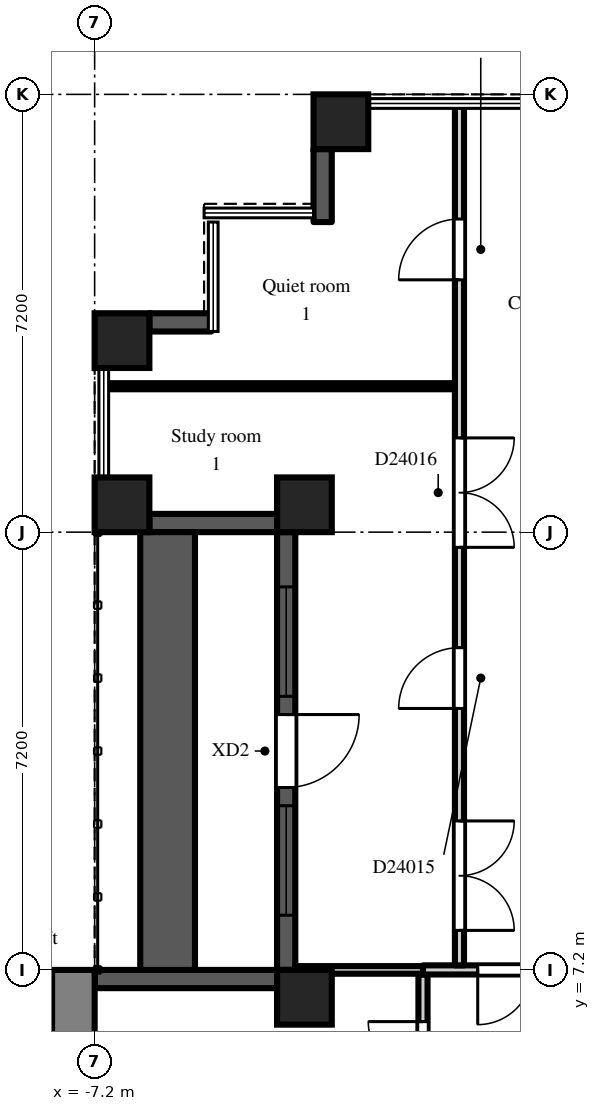
"""IFC4 building model, lengths in metres.
Left out: names, types, materials, properties, quantities, classifications, styles, units other than length and angle.
Written with IfcOpenShell. Run it as: python <this file> out.ifc"""

import sys

from ifc_helpers import new_model, si_unit, direction, frame, frame_2d, origin, origin_2d, place, context, subcontext, project, spatial, rectangle, extrude, element, fill, save


model = new_model("IFC4")
c1 = context("Model", 3, precision=1e-05, world=origin(), true_north=direction((0.0, 1.0)))
c2 = subcontext(c1, "Body", "Model", "MODEL_VIEW")
j1 = project(units=[si_unit("LENGTHUNIT", "METRE"), si_unit("PLANEANGLEUNIT", "RADIAN")], contexts=[c1])
p1 = place(None, origin())
s1 = spatial("IfcSite", under=j1, at=p1, CompositionType="ELEMENT")
p2 = place(p1, origin())
s2 = spatial("IfcBuilding", under=s1, at=p2, CompositionType="ELEMENT")
p3 = place(p2, frame((0.0, 0.0, 166.5)))
s3 = spatial("IfcBuildingStorey", under=s2, at=p3, CompositionType="ELEMENT", Elevation=166.5)
for number, where, z_axis, x_axis in (
    (1, (-6.75, 14.85, 0.0), (0.0, 0.0, 1.0), (1.0, 0.0, 0.0)),
    (2, (-6.75, 17.55, 0.0), (0.0, 0.0, 1.0), (1.0, 0.0, 0.0)),
    (3, (-3.75, 6.75, 0.0), (0.0, 0.0, 1.0), (1.0, 0.0, 0.0)),
    (4, (-3.75, 14.85, 0.0), (0.0, 0.0, 1.0), (1.0, 0.0, 0.0)),
    (5, (-3.15, 21.15, 0.0), (0.0, 0.0, 1.0), (1.0, 0.0, 0.0)),
):
    element("IfcColumn", number, at=place(p3, frame(where, z_axis=z_axis, x_axis=x_axis)), inside=s3, PredefinedType="COLUMN", context=c2, shape_type="SweptSolid", body=[
        extrude(rectangle(XDim=0.9, YDim=0.9, at=origin_2d()), origin(), (0.0, 0.0, 1.0), 4.2),
    ])
p4 = place(p3, frame((-3.45, 20.7, 0.0), z_axis=(0.0, 0.0, 1.0), x_axis=(0.0, -1.0, 0.0)))
e6 = element("IfcWall", 6, at=p4, inside=s3, PredefinedType="SOLIDWALL", context=c2, shape_type="SweptSolid", body=[
    extrude(rectangle(XDim=1.2, YDim=0.3, at=frame_2d((0.6, 0.0))), origin(), (0.0, 0.0, 1.0), 3.8),
])
p5 = place(p3, frame((-5.28, 17.85, 0.0), z_axis=(0.0, 0.0, 1.0), x_axis=(-1.0, 0.0, 0.0)))
e7 = element("IfcWall", 7, at=p5, inside=s3, PredefinedType="SOLIDWALL", context=c2, shape_type="SweptSolid", body=[
    extrude(rectangle(XDim=1.02, YDim=0.3, at=frame_2d((0.51, 0.0))), origin(), (0.0, 0.0, 1.0), 3.8),
])
p6 = place(p3, frame((-6.3, 14.55, 0.0), z_axis=(0.0, 0.0, 1.0), x_axis=(1.0, 0.0, 0.0)))
e8 = element("IfcWall", 8, at=p6, inside=s3, PredefinedType="SOLIDWALL", context=c2, shape_type="SweptSolid", body=[
    extrude(rectangle(XDim=2.1, YDim=0.3, at=frame_2d((1.05, 0.0))), origin(), (0.0, 0.0, 1.0), 3.4),
])
p7 = place(p3, frame((-4.05, 14.4, 0.0), z_axis=(0.0, 0.0, 1.0), x_axis=(0.0, -1.0, 0.0)))
e9 = element("IfcWall", 9, at=p7, inside=s3, PredefinedType="SOLIDWALL", context=c2, shape_type="SweptSolid", body=[
    extrude(rectangle(XDim=7.2, YDim=0.3, at=frame_2d((3.6, 0.0))), origin(), (0.0, 0.0, 1.0), 3.4),
])
p8 = place(p7, frame((3.0, 0.0, 0.0)))
e10 = element("IfcOpeningElement", 10, at=p8, cuts=e9, PredefinedType="OPENING", context=c2, shape_type="SweptSolid", body=[
    extrude(rectangle(XDim=1.2, YDim=2.05, at=frame_2d((0.6, 1.025))), frame((0.0, 0.16, 0.0), z_axis=(0.0, -1.0, 0.0), x_axis=(1.0, 0.0, 0.0)), (0.0, 0.0, 1.0), 0.32),
])
p9 = place(p7, frame((0.9, 0.0, 0.2)))
e11 = element("IfcOpeningElement", 11, at=p9, cuts=e9, PredefinedType="OPENING", context=c2, shape_type="SweptSolid", body=[
    extrude(rectangle(XDim=1.8, YDim=1.85, at=frame_2d((0.9, 0.925))), frame((0.0, 0.16, 0.0), z_axis=(0.0, -1.0, 0.0), x_axis=(1.0, 0.0, 0.0)), (0.0, 0.0, 1.0), 0.32),
])
p10 = place(p7, frame((4.5, 0.0, 0.2)))
e12 = element("IfcOpeningElement", 12, at=p10, cuts=e9, PredefinedType="OPENING", context=c2, shape_type="SweptSolid", body=[
    extrude(rectangle(XDim=1.8, YDim=1.85, at=frame_2d((0.9, 0.925))), frame((0.0, 0.16, 0.0), z_axis=(0.0, -1.0, 0.0), x_axis=(1.0, 0.0, 0.0)), (0.0, 0.0, 1.0), 0.32),
])
p11 = place(p3, frame((-4.2, 7.05, 0.0), z_axis=(0.0, 0.0, 1.0), x_axis=(-1.0, 0.0, 0.0)))
e13 = element("IfcWall", 13, at=p11, inside=s3, PredefinedType="SOLIDWALL", context=c2, shape_type="SweptSolid", body=[
    extrude(rectangle(XDim=3.0, YDim=0.3, at=frame_2d((1.5, 0.0))), origin(), (0.0, 0.0, 1.0), 3.4),
])
p12 = place(p3, frame((-6.0, 7.2, 0.0), z_axis=(0.0, 0.0, 1.0), x_axis=(0.0, 1.0, 0.0)))
e14 = element("IfcWall", 14, at=p12, inside=s3, PredefinedType="PARAPET", context=c2, shape_type="SweptSolid", body=[
    extrude(rectangle(XDim=7.2, YDim=0.9, at=frame_2d((3.6, 0.0))), origin(), (0.0, 0.0, 1.0), 0.8),
])
p13 = place(p3, frame((-7.55, -7.2, 0.0), z_axis=(0.0, 0.0, 1.0), x_axis=(0.0, 1.0, 0.0)))
e15 = element("IfcWall", 15, at=p13, inside=s3, PredefinedType="SHEAR", context=c2, shape_type="SweptSolid", body=[
    extrude(rectangle(XDim=14.4, YDim=0.7, at=frame_2d((7.2, 0.0))), origin(), (0.0, 0.0, 1.0), 3.8),
])
p14 = place(p13, frame((6.0, 0.0, 0.0)))
e16 = element("IfcOpeningElement", 16, at=p14, cuts=e15, PredefinedType="OPENING", context=c2, shape_type="SweptSolid", body=[
    extrude(rectangle(XDim=2.4, YDim=2.2, at=frame_2d((1.2, 1.1))), frame((0.0, 0.36, 0.0), z_axis=(0.0, -1.0, 0.0), x_axis=(1.0, 0.0, 0.0)), (0.0, 0.0, 1.0), 0.72),
])
p15 = place(p3, frame((-7.02, 16.8, 0.0), z_axis=(0.0, 0.0, 1.0), x_axis=(1.0, 0.0, 0.0)))
e17 = element("IfcWall", 17, at=p15, inside=s3, PredefinedType="PARTITIONING", context=c2, shape_type="SweptSolid", body=[
    extrude(rectangle(XDim=5.745, YDim=0.1, at=frame_2d((2.873, 0.0))), origin(), (0.0, 0.0, 1.0), 3.8),
])
p16 = place(p3, frame((-3.9, 7.2, 0.0), z_axis=(0.0, 0.0, 1.0), x_axis=(1.0, 0.0, 0.0)))
e18 = element("IfcWall", 18, at=p16, inside=s3, PredefinedType="PARTITIONING", context=c2, shape_type="SweptSolid", body=[
    extrude(rectangle(XDim=2.1, YDim=0.125, at=frame_2d((1.05, 0.0))), origin(), (0.0, 0.0, 1.0), 3.8),
])
p17 = place(p3, frame((-1.8, 1.725, 0.0), z_axis=(0.0, 0.0, 1.0), x_axis=(0.0, 1.0, 0.0)))
e19 = element("IfcWall", 19, at=p17, inside=s3, PredefinedType="PARTITIONING", context=c2, shape_type="SweptSolid", body=[
    extrude(rectangle(XDim=5.4, YDim=0.15, at=frame_2d((2.7, 0.0))), origin(), (0.0, 0.0, 1.0), 3.8),
])
p18 = place(p17, frame((3.725, 0.0, 0.0)))
e20 = element("IfcOpeningElement", 20, at=p18, cuts=e19, PredefinedType="OPENING", context=c2, shape_type="SweptSolid", body=[
    extrude(rectangle(XDim=0.9, YDim=2.1, at=frame_2d((0.45, 1.05))), frame((0.0, 0.085, 0.0), z_axis=(0.0, -1.0, 0.0), x_axis=(1.0, 0.0, 0.0)), (0.0, 0.0, 1.0), 0.17),
])
p19 = place(p3, frame((-1.8, 7.2, 0.0), z_axis=(0.0, 0.0, 1.0), x_axis=(1.0, 0.0, 0.0)))
e21 = element("IfcWall", 21, at=p19, inside=s3, PredefinedType="PARTITIONING", context=c2, shape_type="SweptSolid", body=[
    extrude(rectangle(XDim=3.6, YDim=0.15, at=frame_2d((1.8, 0.0))), origin(), (0.0, 0.0, 1.0), 3.8),
])
p20 = place(p19, frame((0.9, 0.0, 0.0)))
e22 = element("IfcOpeningElement", 22, at=p20, cuts=e21, PredefinedType="OPENING", context=c2, shape_type="SweptSolid", body=[
    extrude(rectangle(XDim=1.8, YDim=2.1, at=frame_2d((0.9, 1.05))), frame((0.0, 0.085, 0.0), z_axis=(0.0, -1.0, 0.0), x_axis=(1.0, 0.0, 0.0)), (0.0, 0.0, 1.0), 0.17),
])
p21 = place(p3, frame((-1.2, 7.275, 0.0), z_axis=(0.0, 0.0, 1.0), x_axis=(0.0, 1.0, 0.0)))
e23 = element("IfcWall", 23, at=p21, inside=s3, PredefinedType="PARTITIONING", context=c2, shape_type="SweptSolid", body=[
    extrude(rectangle(XDim=14.145, YDim=0.15, at=frame_2d((7.073, 0.0))), origin(), (0.0, 0.0, 1.0), 3.8),
])
p22 = place(p21, frame((0.575, 0.0, 0.0)))
e24 = element("IfcOpeningElement", 24, at=p22, cuts=e23, PredefinedType="OPENING", context=c2, shape_type="SweptSolid", body=[
    extrude(rectangle(XDim=1.8, YDim=2.1, at=frame_2d((0.9, 1.05))), frame((0.0, 0.085, 0.0), z_axis=(0.0, -1.0, 0.0), x_axis=(1.0, 0.0, 0.0)), (0.0, 0.0, 1.0), 0.17),
])
p23 = place(p21, frame((4.225, 0.0, 0.0)))
e25 = element("IfcOpeningElement", 25, at=p23, cuts=e23, PredefinedType="OPENING", context=c2, shape_type="SweptSolid", body=[
    extrude(rectangle(XDim=1.0, YDim=2.1, at=frame_2d((0.5, 1.05))), frame((0.0, 0.085, 0.0), z_axis=(0.0, -1.0, 0.0), x_axis=(1.0, 0.0, 0.0)), (0.0, 0.0, 1.0), 0.17),
])
p24 = place(p21, frame((6.875, 0.0, 0.0)))
e26 = element("IfcOpeningElement", 26, at=p24, cuts=e23, PredefinedType="OPENING", context=c2, shape_type="SweptSolid", body=[
    extrude(rectangle(XDim=1.8, YDim=2.1, at=frame_2d((0.9, 1.05))), frame((0.0, 0.085, 0.0), z_axis=(0.0, -1.0, 0.0), x_axis=(1.0, 0.0, 0.0)), (0.0, 0.0, 1.0), 0.17),
])
p25 = place(p21, frame((11.275, 0.0, 0.0)))
e27 = element("IfcOpeningElement", 27, at=p25, cuts=e23, PredefinedType="OPENING", context=c2, shape_type="SweptSolid", body=[
    extrude(rectangle(XDim=1.0, YDim=2.1, at=frame_2d((0.5, 1.05))), frame((0.0, 0.085, 0.0), z_axis=(0.0, -1.0, 0.0), x_axis=(1.0, 0.0, 0.0)), (0.0, 0.0, 1.0), 0.17),
])
p26 = place(p8, origin())
e28 = element("IfcDoor", 28, at=p26, inside=s3, OperationType="SINGLE_SWING_LEFT", PredefinedType="DOOR", context=c2, shape_type="SweptSolid", body=[
    extrude(rectangle(XDim=1.2, YDim=2.05, at=frame_2d((0.6, 1.025))), frame((0.0, 0.025, 0.0), z_axis=(0.0, -1.0, 0.0), x_axis=(1.0, 0.0, 0.0)), (0.0, 0.0, 1.0), 0.05),
])
fill(e10, e28)
p27 = place(p9, origin())
e29 = element("IfcWindow", 29, at=p27, inside=s3, PartitioningType="SINGLE_PANEL", PredefinedType="WINDOW", context=c2, shape_type="SweptSolid", body=[
    extrude(rectangle(XDim=1.8, YDim=1.85, at=frame_2d((0.9, 0.925))), frame((0.0, 0.03, 0.0), z_axis=(0.0, -1.0, 0.0), x_axis=(1.0, 0.0, 0.0)), (0.0, 0.0, 1.0), 0.06),
])
fill(e11, e29)
p28 = place(p10, origin())
e30 = element("IfcWindow", 30, at=p28, inside=s3, PartitioningType="SINGLE_PANEL", PredefinedType="WINDOW", context=c2, shape_type="SweptSolid", body=[
    extrude(rectangle(XDim=1.8, YDim=1.85, at=frame_2d((0.9, 0.925))), frame((0.0, 0.03, 0.0), z_axis=(0.0, -1.0, 0.0), x_axis=(1.0, 0.0, 0.0)), (0.0, 0.0, 1.0), 0.06),
])
fill(e12, e30)
p29 = place(p18, origin())
e31 = element("IfcDoor", 31, at=p29, inside=s3, OperationType="SINGLE_SWING_RIGHT", PredefinedType="DOOR", context=c2, shape_type="SweptSolid", body=[
    extrude(rectangle(XDim=0.9, YDim=2.1, at=frame_2d((0.45, 1.05))), frame((0.0, 0.025, 0.0), z_axis=(0.0, -1.0, 0.0), x_axis=(1.0, 0.0, 0.0)), (0.0, 0.0, 1.0), 0.05),
])
fill(e20, e31)
p30 = place(p20, frame((1.8, 0.0, 0.0), z_axis=(0.0, 0.0, 1.0), x_axis=(-1.0, 0.0, 0.0)))
e32 = element("IfcDoor", 32, at=p30, inside=s3, OperationType="DOUBLE_DOOR_DOUBLE_SWING", PredefinedType="DOOR", context=c2, shape_type="SweptSolid", body=[
    extrude(rectangle(XDim=1.8, YDim=2.1, at=frame_2d((0.9, 1.05))), frame((0.0, 0.025, 0.0), z_axis=(0.0, -1.0, 0.0), x_axis=(1.0, 0.0, 0.0)), (0.0, 0.0, 1.0), 0.05),
])
fill(e22, e32)
p31 = place(p22, frame((1.8, 0.0, 0.0), z_axis=(0.0, 0.0, 1.0), x_axis=(-1.0, 0.0, 0.0)))
e33 = element("IfcDoor", 33, at=p31, inside=s3, OperationType="DOUBLE_DOOR_DOUBLE_SWING", PredefinedType="DOOR", context=c2, shape_type="SweptSolid", body=[
    extrude(rectangle(XDim=1.8, YDim=2.1, at=frame_2d((0.9, 1.05))), frame((0.0, 0.025, 0.0), z_axis=(0.0, -1.0, 0.0), x_axis=(1.0, 0.0, 0.0)), (0.0, 0.0, 1.0), 0.05),
])
fill(e24, e33)
p32 = place(p23, origin())
e34 = element("IfcDoor", 34, at=p32, inside=s3, OperationType="SINGLE_SWING_LEFT", PredefinedType="DOOR", context=c2, shape_type="SweptSolid", body=[
    extrude(rectangle(XDim=1.0, YDim=2.1, at=frame_2d((0.5, 1.05))), frame((0.0, 0.025, 0.0), z_axis=(0.0, -1.0, 0.0), x_axis=(1.0, 0.0, 0.0)), (0.0, 0.0, 1.0), 0.05),
])
fill(e25, e34)
p33 = place(p24, frame((1.8, 0.0, 0.0), z_axis=(0.0, 0.0, 1.0), x_axis=(-1.0, 0.0, 0.0)))
e35 = element("IfcDoor", 35, at=p33, inside=s3, OperationType="DOUBLE_DOOR_DOUBLE_SWING", PredefinedType="DOOR", context=c2, shape_type="SweptSolid", body=[
    extrude(rectangle(XDim=1.8, YDim=2.1, at=frame_2d((0.9, 1.05))), frame((0.0, 0.025, 0.0), z_axis=(0.0, -1.0, 0.0), x_axis=(1.0, 0.0, 0.0)), (0.0, 0.0, 1.0), 0.05),
])
fill(e26, e35)
p34 = place(p25, origin())
e36 = element("IfcDoor", 36, at=p34, inside=s3, OperationType="SINGLE_SWING_LEFT", PredefinedType="DOOR", context=c2, shape_type="SweptSolid", body=[
    extrude(rectangle(XDim=1.0, YDim=2.1, at=frame_2d((0.5, 1.05))), frame((0.0, 0.025, 0.0), z_axis=(0.0, -1.0, 0.0), x_axis=(1.0, 0.0, 0.0)), (0.0, 0.0, 1.0), 0.05),
])
fill(e27, e36)
save(model, sys.argv[1])
